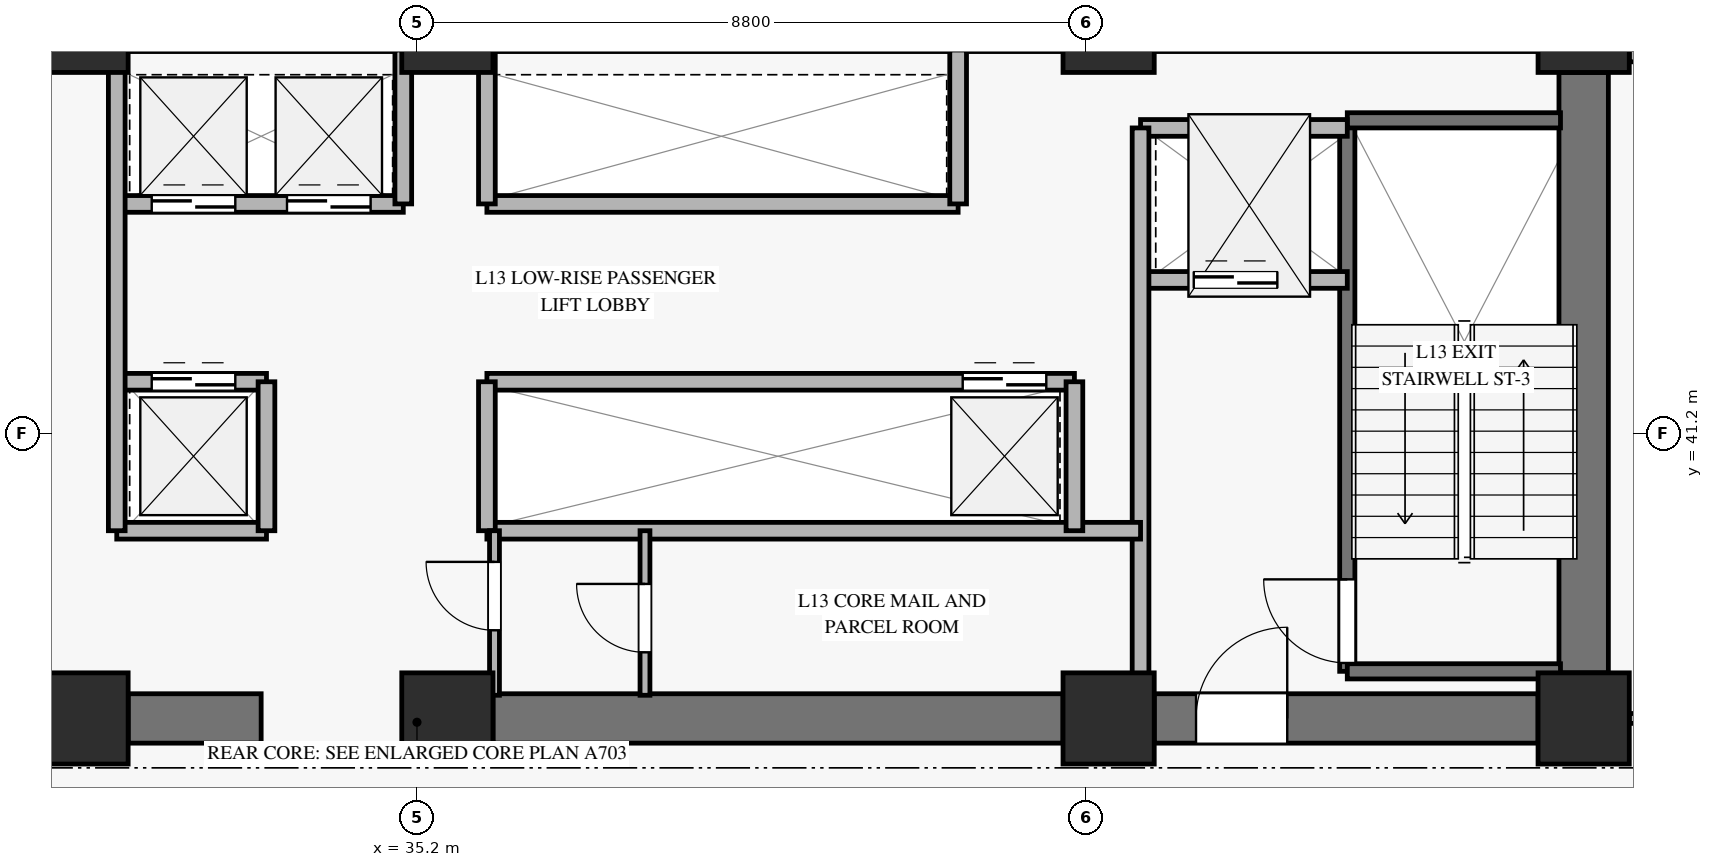
"""IFC4 building model, lengths in metres.
Left out: names, types, materials, properties, quantities, classifications, styles, units other than length and angle.
Written with IfcOpenShell. Run it as: python <this file> out.ifc"""

import sys

from ifc_helpers import new_model, si_unit, direction, frame, frame_2d, origin, origin_2d, place, context, subcontext, project, spatial, rectangle, extrude, source, transform, mapped, element, fill, save


model = new_model("IFC4")
c1 = context("Model", 3, precision=1e-05, world=origin(), true_north=direction((0.0, 1.0)))
c2 = subcontext(c1, "Body", "Model", "MODEL_VIEW")
j1 = project(units=[si_unit("LENGTHUNIT", "METRE"), si_unit("PLANEANGLEUNIT", "RADIAN")], contexts=[c1])
p1 = place(None, origin())
s1 = spatial("IfcSite", under=j1, at=p1, CompositionType="ELEMENT")
p2 = place(p1, origin())
s2 = spatial("IfcBuilding", under=s1, at=p2, CompositionType="ELEMENT")
p3 = place(p2, frame((0.0, 0.0, 53.3)))
s3 = spatial("IfcBuildingStorey", under=s2, at=p3, CompositionType="ELEMENT", Elevation=53.3)
m1 = source(origin(), c2, "Body", "SweptSolid", [
    extrude(rectangle(XDim=1.2, YDim=1.2, at=origin_2d()), origin(), (0.0, 0.0, 1.0), 3.68),
])
for number, where, z_axis, x_axis in (
    (1, (30.8, 37.45, 0.0), (0.0, 0.0, 1.0), (1.0, 0.0, 0.0)),
    (2, (30.8, 46.55, 0.0), (0.0, 0.0, 1.0), (1.0, 0.0, 0.0)),
    (3, (35.6, 37.45, 0.0), (0.0, 0.0, 1.0), (1.0, 0.0, 0.0)),
    (4, (35.6, 46.55, 0.0), (0.0, 0.0, 1.0), (1.0, 0.0, 0.0)),
    (5, (44.3, 37.45, 0.0), (0.0, 0.0, 1.0), (1.0, 0.0, 0.0)),
    (6, (44.3, 46.55, 0.0), (0.0, 0.0, 1.0), (1.0, 0.0, 0.0)),
    (7, (50.55, 37.45, 0.0), (0.0, 0.0, 1.0), (1.0, 0.0, 0.0)),
    (8, (50.55, 46.55, 0.0), (0.0, 0.0, 1.0), (1.0, 0.0, 0.0)),
):
    element("IfcColumn", number, at=place(p3, frame(where, z_axis=z_axis, x_axis=x_axis)), inside=s3, PredefinedType="PILASTER", context=c2, shape_type="MappedRepresentation", body=[
        mapped(m1, transform((0.0, 0.0, 0.0), x_axis=(1.0, 0.0, 0.0), y_axis=(0.0, 1.0, 0.0), z_axis=(0.0, 0.0, 1.0), scale=1.0)),
    ])
p4 = place(p3, frame((31.4, 37.45, 0.0), z_axis=(0.0, 0.0, 1.0), x_axis=(1.0, 0.0, 0.0)))
e9 = element("IfcWall", 9, at=p4, inside=s3, PredefinedType="SHEAR", context=c2, shape_type="SweptSolid", body=[
    extrude(rectangle(XDim=1.75, YDim=0.65, at=frame_2d((0.875, 0.0))), origin(), (0.0, 0.0, 1.0), 3.68),
])
p5 = place(p3, frame((36.2, 37.45, 0.0), z_axis=(0.0, 0.0, 1.0), x_axis=(1.0, 0.0, 0.0)))
e10 = element("IfcWall", 10, at=p5, inside=s3, PredefinedType="SHEAR", context=c2, shape_type="SweptSolid", body=[
    extrude(rectangle(XDim=7.5, YDim=0.65, at=frame_2d((3.75, 0.0))), origin(), (0.0, 0.0, 1.0), 3.68),
])
p6 = place(p3, frame((44.9, 37.45, 0.0), z_axis=(0.0, 0.0, 1.0), x_axis=(1.0, 0.0, 0.0)))
e11 = element("IfcWall", 11, at=p6, inside=s3, PredefinedType="SHEAR", context=c2, shape_type="SweptSolid", body=[
    extrude(rectangle(XDim=5.05, YDim=0.65, at=frame_2d((2.525, 0.0))), origin(), (0.0, 0.0, 1.0), 3.68),
])
p7 = place(p6, frame((0.55, 0.0, 0.0)))
e12 = element("IfcOpeningElement", 12, at=p7, cuts=e11, PredefinedType="OPENING", context=c2, shape_type="SweptSolid", body=[
    extrude(rectangle(XDim=1.2, YDim=2.15, at=frame_2d((0.6, 1.075))), frame((0.0, 0.335, 0.0), z_axis=(0.0, -1.0, 0.0), x_axis=(1.0, 0.0, 0.0)), (0.0, 0.0, 1.0), 0.67),
])
p8 = place(p3, frame((50.55, 38.05, 0.0), z_axis=(0.0, 0.0, 1.0), x_axis=(0.0, 1.0, 0.0)))
e13 = element("IfcWall", 13, at=p8, inside=s3, PredefinedType="SHEAR", context=c2, shape_type="SweptSolid", body=[
    extrude(rectangle(XDim=7.9, YDim=0.65, at=frame_2d((3.95, 0.0))), origin(), (0.0, 0.0, 1.0), 3.68),
])
p9 = place(p3, frame((51.15, 46.25, 0.0), z_axis=(0.0, 0.0, 1.0), x_axis=(1.0, 0.0, 0.0)))
e14 = element("IfcWall", 14, at=p9, inside=s3, PredefinedType="SOLIDWALL", context=c2, shape_type="SweptSolid", body=[
    extrude(rectangle(XDim=11.982, YDim=0.32, at=frame_2d((5.991, 0.0))), origin(), (0.0, 0.0, 1.0), 3.16),
])
p10 = place(p9, frame((5.191, 0.0, 0.45)))
e15 = element("IfcOpeningElement", 15, at=p10, cuts=e14, PredefinedType="OPENING", context=c2, shape_type="SweptSolid", body=[
    extrude(rectangle(XDim=1.6, YDim=2.0, at=frame_2d((0.8, 1.0))), frame((0.0, 0.17, 0.0), z_axis=(0.0, -1.0, 0.0), x_axis=(1.0, 0.0, 0.0)), (0.0, 0.0, 1.0), 0.34),
])
p11 = place(p3, frame((47.44, 38.07, 0.0), z_axis=(0.0, 0.0, 1.0), x_axis=(0.0, 1.0, 0.0)))
e16 = element("IfcWall", 16, at=p11, inside=s3, PredefinedType="SOLIDWALL", context=c2, shape_type="SweptSolid", body=[
    extrude(rectangle(XDim=7.25, YDim=0.2, at=frame_2d((3.625, 0.0))), origin(), (0.0, 0.0, 1.0), 3.9),
])
p12 = place(p11, frame((0.11, 0.0, 0.0)))
e17 = element("IfcOpeningElement", 17, at=p12, cuts=e16, PredefinedType="OPENING", context=c2, shape_type="SweptSolid", body=[
    extrude(rectangle(XDim=1.1, YDim=2.15, at=frame_2d((0.55, 1.075))), frame((0.0, 0.11, 0.0), z_axis=(0.0, -1.0, 0.0), x_axis=(1.0, 0.0, 0.0)), (0.0, 0.0, 1.0), 0.22),
])
for number, where, z_axis, x_axis in (
    (18, (47.44, 45.32, 0.0), (0.0, 0.0, 1.0), (1.0, 0.0, 0.0)),
    (19, (47.44, 38.07, 0.0), (0.0, 0.0, 1.0), (1.0, 0.0, 0.0)),
):
    element("IfcWall", number, at=place(p3, frame(where, z_axis=z_axis, x_axis=x_axis)), inside=s3, PredefinedType="SOLIDWALL", context=c2, shape_type="SweptSolid", body=[
        extrude(rectangle(XDim=2.805, YDim=0.2, at=frame_2d((1.403, 0.0))), origin(), (0.0, 0.0, 1.0), 3.9),
    ])
p13 = place(p3, frame((44.72, 43.22, 0.0), z_axis=(0.0, 0.0, 1.0), x_axis=(1.0, 0.0, 0.0)))
e20 = element("IfcWall", 20, at=p13, inside=s3, PredefinedType="SOLIDWALL", context=c2, shape_type="SweptSolid", body=[
    extrude(rectangle(XDim=2.72, YDim=0.22, at=frame_2d((1.36, 0.0))), origin(), (0.0, 0.0, 1.0), 3.68),
])
p14 = place(p13, frame((0.7, 0.0, 0.0)))
e21 = element("IfcOpeningElement", 21, at=p14, cuts=e20, PredefinedType="OPENING", context=c2, shape_type="SweptSolid", body=[
    extrude(rectangle(XDim=1.1, YDim=2.2, at=frame_2d((0.55, 1.1))), frame((0.0, 0.12, 0.0), z_axis=(0.0, -1.0, 0.0), x_axis=(1.0, 0.0, 0.0)), (0.0, 0.0, 1.0), 0.24),
])
p15 = place(p3, frame((44.72, 45.22, 0.0), z_axis=(0.0, 0.0, 1.0), x_axis=(1.0, 0.0, 0.0)))
e22 = element("IfcWall", 22, at=p15, inside=s3, PredefinedType="SOLIDWALL", context=c2, shape_type="SweptSolid", body=[
    extrude(rectangle(XDim=2.72, YDim=0.22, at=frame_2d((1.36, 0.0))), origin(), (0.0, 0.0, 1.0), 3.68),
])
p16 = place(p3, frame((44.72, 37.755, 0.0), z_axis=(0.0, 0.0, 1.0), x_axis=(0.0, 1.0, 0.0)))
e23 = element("IfcWall", 23, at=p16, inside=s3, PredefinedType="SOLIDWALL", context=c2, shape_type="SweptSolid", body=[
    extrude(rectangle(XDim=7.465, YDim=0.22, at=frame_2d((3.732, 0.0))), origin(), (0.0, 0.0, 1.0), 3.68),
])
p17 = place(p3, frame((31.25, 44.22, 0.0), z_axis=(0.0, 0.0, 1.0), x_axis=(1.0, 0.0, 0.0)))
e24 = element("IfcWall", 24, at=p17, inside=s3, PredefinedType="SOLIDWALL", context=c2, shape_type="SweptSolid", body=[
    extrude(rectangle(XDim=3.77, YDim=0.22, at=frame_2d((1.885, 0.0))), origin(), (0.0, 0.0, 1.0), 3.68),
])
p18 = place(p17, frame((0.46, 0.0, 0.0)))
e25 = element("IfcOpeningElement", 25, at=p18, cuts=e24, PredefinedType="OPENING", context=c2, shape_type="SweptSolid", body=[
    extrude(rectangle(XDim=1.1, YDim=2.2, at=frame_2d((0.55, 1.1))), frame((0.0, 0.12, 0.0), z_axis=(0.0, -1.0, 0.0), x_axis=(1.0, 0.0, 0.0)), (0.0, 0.0, 1.0), 0.24),
])
p19 = place(p17, frame((2.24, 0.0, 0.0)))
e26 = element("IfcOpeningElement", 26, at=p19, cuts=e24, PredefinedType="OPENING", context=c2, shape_type="SweptSolid", body=[
    extrude(rectangle(XDim=1.1, YDim=2.2, at=frame_2d((0.55, 1.1))), frame((0.0, 0.12, 0.0), z_axis=(0.0, -1.0, 0.0), x_axis=(1.0, 0.0, 0.0)), (0.0, 0.0, 1.0), 0.24),
])
p20 = place(p3, frame((36.12, 44.22, 0.0), z_axis=(0.0, 0.0, 1.0), x_axis=(1.0, 0.0, 0.0)))
e27 = element("IfcWall", 27, at=p20, inside=s3, PredefinedType="SOLIDWALL", context=c2, shape_type="SweptSolid", body=[
    extrude(rectangle(XDim=6.2, YDim=0.22, at=frame_2d((3.1, 0.0))), origin(), (0.0, 0.0, 1.0), 3.68),
])
for number, where, z_axis, x_axis in (
    (28, (35.02, 44.22, 0.0), (0.0, 0.0, 1.0), (0.0, 1.0, 0.0)),
    (29, (36.12, 44.22, 0.0), (0.0, 0.0, 1.0), (0.0, 1.0, 0.0)),
    (30, (42.32, 44.22, 0.0), (0.0, 0.0, 1.0), (0.0, 1.0, 0.0)),
):
    element("IfcWall", number, at=place(p3, frame(where, z_axis=z_axis, x_axis=x_axis)), inside=s3, PredefinedType="SOLIDWALL", context=c2, shape_type="SweptSolid", body=[
        extrude(rectangle(XDim=2.025, YDim=0.22, at=frame_2d((1.013, 0.0))), origin(), (0.0, 0.0, 1.0), 3.68),
    ])
p21 = place(p3, frame((31.25, 41.88, 0.0), z_axis=(0.0, 0.0, 1.0), x_axis=(1.0, 0.0, 0.0)))
e31 = element("IfcWall", 31, at=p21, inside=s3, PredefinedType="SOLIDWALL", context=c2, shape_type="SweptSolid", body=[
    extrude(rectangle(XDim=1.97, YDim=0.22, at=frame_2d((0.985, 0.0))), origin(), (0.0, 0.0, 1.0), 3.68),
])
p22 = place(p21, frame((0.46, 0.0, 0.0)))
e32 = element("IfcOpeningElement", 32, at=p22, cuts=e31, PredefinedType="OPENING", context=c2, shape_type="SweptSolid", body=[
    extrude(rectangle(XDim=1.1, YDim=2.2, at=frame_2d((0.55, 1.1))), frame((0.0, 0.12, 0.0), z_axis=(0.0, -1.0, 0.0), x_axis=(1.0, 0.0, 0.0)), (0.0, 0.0, 1.0), 0.24),
])
p23 = place(p3, frame((36.12, 41.88, 0.0), z_axis=(0.0, 0.0, 1.0), x_axis=(1.0, 0.0, 0.0)))
e33 = element("IfcWall", 33, at=p23, inside=s3, PredefinedType="SOLIDWALL", context=c2, shape_type="SweptSolid", body=[
    extrude(rectangle(XDim=7.73, YDim=0.22, at=frame_2d((3.865, 0.0))), origin(), (0.0, 0.0, 1.0), 3.68),
])
p24 = place(p23, frame((6.26, 0.0, 0.0)))
e34 = element("IfcOpeningElement", 34, at=p24, cuts=e33, PredefinedType="OPENING", context=c2, shape_type="SweptSolid", body=[
    extrude(rectangle(XDim=1.1, YDim=2.2, at=frame_2d((0.55, 1.1))), frame((0.0, 0.12, 0.0), z_axis=(0.0, -1.0, 0.0), x_axis=(1.0, 0.0, 0.0)), (0.0, 0.0, 1.0), 0.24),
])
p25 = place(p3, frame((31.25, 39.92, 0.0), z_axis=(0.0, 0.0, 1.0), x_axis=(1.0, 0.0, 0.0)))
e35 = element("IfcWall", 35, at=p25, inside=s3, PredefinedType="SOLIDWALL", context=c2, shape_type="SweptSolid", body=[
    extrude(rectangle(XDim=1.97, YDim=0.22, at=frame_2d((0.985, 0.0))), origin(), (0.0, 0.0, 1.0), 3.68),
])
p26 = place(p3, frame((33.22, 39.92, 0.0), z_axis=(0.0, 0.0, 1.0), x_axis=(0.0, 1.0, 0.0)))
e36 = element("IfcWall", 36, at=p26, inside=s3, PredefinedType="SOLIDWALL", context=c2, shape_type="SweptSolid", body=[
    extrude(rectangle(XDim=1.96, YDim=0.22, at=frame_2d((0.98, 0.0))), origin(), (0.0, 0.0, 1.0), 3.68),
])
p27 = place(p3, frame((36.12, 39.92, 0.0), z_axis=(0.0, 0.0, 1.0), x_axis=(1.0, 0.0, 0.0)))
e37 = element("IfcWall", 37, at=p27, inside=s3, PredefinedType="SOLIDWALL", context=c2, shape_type="SweptSolid", body=[
    extrude(rectangle(XDim=8.6, YDim=0.22, at=frame_2d((4.3, 0.0))), origin(), (0.0, 0.0, 1.0), 2.965),
])
p28 = place(p3, frame((36.12, 39.92, 0.0), z_axis=(0.0, 0.0, 1.0), x_axis=(0.0, 1.0, 0.0)))
e38 = element("IfcWall", 38, at=p28, inside=s3, PredefinedType="SOLIDWALL", context=c2, shape_type="SweptSolid", body=[
    extrude(rectangle(XDim=1.96, YDim=0.22, at=frame_2d((0.98, 0.0))), origin(), (0.0, 0.0, 1.0), 3.68),
])
p29 = place(p3, frame((31.25, 39.92, 0.0), z_axis=(0.0, 0.0, 1.0), x_axis=(0.0, 1.0, 0.0)))
e39 = element("IfcWall", 39, at=p29, inside=s3, PredefinedType="SOLIDWALL", context=c2, shape_type="SweptSolid", body=[
    extrude(rectangle(XDim=6.325, YDim=0.22, at=frame_2d((3.163, 0.0))), origin(), (0.0, 0.0, 1.0), 3.68),
])
p30 = place(p3, frame((43.85, 39.92, 0.0), z_axis=(0.0, 0.0, 1.0), x_axis=(0.0, 1.0, 0.0)))
e40 = element("IfcWall", 40, at=p30, inside=s3, PredefinedType="SOLIDWALL", context=c2, shape_type="SweptSolid", body=[
    extrude(rectangle(XDim=1.96, YDim=0.22, at=frame_2d((0.98, 0.0))), origin(), (0.0, 0.0, 1.0), 3.68),
])
p31 = place(p3, frame((36.22, 37.755, 0.0), z_axis=(0.0, 0.0, 1.0), x_axis=(0.0, 1.0, 0.0)))
e41 = element("IfcWall", 41, at=p31, inside=s3, PredefinedType="PARTITIONING", context=c2, shape_type="SweptSolid", body=[
    extrude(rectangle(XDim=2.165, YDim=0.13, at=frame_2d((1.083, 0.0))), origin(), (0.0, 0.0, 1.0), 3.68),
])
p32 = place(p31, frame((0.855, 0.0, 0.0)))
e42 = element("IfcOpeningElement", 42, at=p32, cuts=e41, PredefinedType="OPENING", context=c2, shape_type="SweptSolid", body=[
    extrude(rectangle(XDim=0.9, YDim=2.1, at=frame_2d((0.45, 1.05))), frame((0.0, 0.075, 0.0), z_axis=(0.0, -1.0, 0.0), x_axis=(1.0, 0.0, 0.0)), (0.0, 0.0, 1.0), 0.15),
])
p33 = place(p3, frame((38.2, 37.755, 0.0), z_axis=(0.0, 0.0, 1.0), x_axis=(0.0, 1.0, 0.0)))
e43 = element("IfcWall", 43, at=p33, inside=s3, PredefinedType="PARTITIONING", context=c2, shape_type="SweptSolid", body=[
    extrude(rectangle(XDim=2.165, YDim=0.13, at=frame_2d((1.083, 0.0))), origin(), (0.0, 0.0, 1.0), 3.68),
])
p34 = place(p33, frame((0.565, 0.0, 0.0)))
e44 = element("IfcOpeningElement", 44, at=p34, cuts=e43, PredefinedType="OPENING", context=c2, shape_type="SweptSolid", body=[
    extrude(rectangle(XDim=0.9, YDim=2.1, at=frame_2d((0.45, 1.05))), frame((0.0, 0.075, 0.0), z_axis=(0.0, -1.0, 0.0), x_axis=(1.0, 0.0, 0.0)), (0.0, 0.0, 1.0), 0.15),
])
p35 = place(p3, frame((51.15, 37.45, 0.0), z_axis=(0.0, 0.0, 1.0), x_axis=(1.0, 0.0, 0.0)))
e45 = element("IfcWall", 45, at=p35, inside=s3, PredefinedType="PARTITIONING", context=c2, shape_type="SweptSolid", body=[
    extrude(rectangle(XDim=15.68, YDim=0.13, at=frame_2d((7.84, 0.0))), origin(), (0.0, 0.0, 1.0), 3.165),
])
p36 = place(p35, frame((0.5, 0.0, 0.0)))
e46 = element("IfcOpeningElement", 46, at=p36, cuts=e45, PredefinedType="OPENING", context=c2, shape_type="SweptSolid", body=[
    extrude(rectangle(XDim=0.9, YDim=2.1, at=frame_2d((0.45, 1.05))), frame((0.0, 0.075, 0.0), z_axis=(0.0, -1.0, 0.0), x_axis=(1.0, 0.0, 0.0)), (0.0, 0.0, 1.0), 0.15),
])
p37 = place(p35, frame((11.416, 0.0, 0.0)))
e47 = element("IfcOpeningElement", 47, at=p37, cuts=e45, PredefinedType="OPENING", context=c2, shape_type="SweptSolid", body=[
    extrude(rectangle(XDim=0.95, YDim=2.1, at=frame_2d((0.475, 1.05))), frame((0.0, 0.075, 0.0), z_axis=(0.0, -1.0, 0.0), x_axis=(1.0, 0.0, 0.0)), (0.0, 0.0, 1.0), 0.15),
])
m2 = source(origin(), c2, "Body", "SweptSolid", [
    extrude(rectangle(XDim=1.1, YDim=2.15, at=frame_2d((0.55, 1.075))), frame((0.0, 0.025, 0.0), z_axis=(0.0, -1.0, 0.0), x_axis=(1.0, 0.0, 0.0)), (0.0, 0.0, 1.0), 0.05),
])
p38 = place(p12, origin())
e48 = element("IfcDoor", 48, at=p38, inside=s3, OperationType="SINGLE_SWING_RIGHT", PredefinedType="DOOR", context=c2, shape_type="MappedRepresentation", body=[
    mapped(m2, transform((0.0, 0.0, 0.0), x_axis=(1.0, 0.0, 0.0), y_axis=(0.0, 1.0, 0.0), z_axis=(0.0, 0.0, 1.0), scale=1.0)),
])
fill(e17, e48)
m3 = source(origin(), c2, "Body", "SweptSolid", [
    extrude(rectangle(XDim=1.1, YDim=2.2, at=frame_2d((0.55, 1.1))), frame((0.0, 0.025, 0.0), z_axis=(0.0, -1.0, 0.0), x_axis=(1.0, 0.0, 0.0)), (0.0, 0.0, 1.0), 0.05),
])
p39 = place(p14, origin())
e49 = element("IfcDoor", 49, at=p39, inside=s3, OperationType="SLIDING_TO_LEFT", PredefinedType="DOOR", context=c2, shape_type="MappedRepresentation", body=[
    mapped(m3, transform((0.0, 0.0, 0.0), x_axis=(1.0, 0.0, 0.0), y_axis=(0.0, 1.0, 0.0), z_axis=(0.0, 0.0, 1.0), scale=1.0)),
])
fill(e21, e49)
m4 = source(origin(), c2, "Body", "SweptSolid", [
    extrude(rectangle(XDim=1.2, YDim=2.15, at=frame_2d((0.6, 1.075))), frame((0.0, 0.025, 0.0), z_axis=(0.0, -1.0, 0.0), x_axis=(1.0, 0.0, 0.0)), (0.0, 0.0, 1.0), 0.05),
])
p40 = place(p7, origin())
e50 = element("IfcDoor", 50, at=p40, inside=s3, OperationType="SINGLE_SWING_RIGHT", PredefinedType="DOOR", context=c2, shape_type="MappedRepresentation", body=[
    mapped(m4, transform((0.0, 0.0, 0.0), x_axis=(1.0, 0.0, 0.0), y_axis=(0.0, 1.0, 0.0), z_axis=(0.0, 0.0, 1.0), scale=1.0)),
])
fill(e12, e50)
p41 = place(p18, origin())
e51 = element("IfcDoor", 51, at=p41, inside=s3, OperationType="SLIDING_TO_LEFT", PredefinedType="DOOR", context=c2, shape_type="MappedRepresentation", body=[
    mapped(m3, transform((0.0, 0.0, 0.0), x_axis=(1.0, 0.0, 0.0), y_axis=(0.0, 1.0, 0.0), z_axis=(0.0, 0.0, 1.0), scale=1.0)),
])
fill(e25, e51)
p42 = place(p19, origin())
e52 = element("IfcDoor", 52, at=p42, inside=s3, OperationType="SLIDING_TO_LEFT", PredefinedType="DOOR", context=c2, shape_type="MappedRepresentation", body=[
    mapped(m3, transform((0.0, 0.0, 0.0), x_axis=(1.0, 0.0, 0.0), y_axis=(0.0, 1.0, 0.0), z_axis=(0.0, 0.0, 1.0), scale=1.0)),
])
fill(e26, e52)
p43 = place(p22, origin())
e53 = element("IfcDoor", 53, at=p43, inside=s3, OperationType="SLIDING_TO_LEFT", PredefinedType="DOOR", context=c2, shape_type="MappedRepresentation", body=[
    mapped(m3, transform((0.0, 0.0, 0.0), x_axis=(1.0, 0.0, 0.0), y_axis=(0.0, 1.0, 0.0), z_axis=(0.0, 0.0, 1.0), scale=1.0)),
])
fill(e32, e53)
p44 = place(p24, origin())
e54 = element("IfcDoor", 54, at=p44, inside=s3, OperationType="SLIDING_TO_LEFT", PredefinedType="DOOR", context=c2, shape_type="MappedRepresentation", body=[
    mapped(m3, transform((0.0, 0.0, 0.0), x_axis=(1.0, 0.0, 0.0), y_axis=(0.0, 1.0, 0.0), z_axis=(0.0, 0.0, 1.0), scale=1.0)),
])
fill(e34, e54)
m5 = source(origin(), c2, "Body", "SweptSolid", [
    extrude(rectangle(XDim=0.9, YDim=2.1, at=frame_2d((0.45, 1.05))), frame((0.0, 0.025, 0.0), z_axis=(0.0, -1.0, 0.0), x_axis=(1.0, 0.0, 0.0)), (0.0, 0.0, 1.0), 0.05),
])
p45 = place(p32, origin())
e55 = element("IfcDoor", 55, at=p45, inside=s3, OperationType="SINGLE_SWING_RIGHT", PredefinedType="DOOR", context=c2, shape_type="MappedRepresentation", body=[
    mapped(m5, transform((0.0, 0.0, 0.0), x_axis=(1.0, 0.0, 0.0), y_axis=(0.0, 1.0, 0.0), z_axis=(0.0, 0.0, 1.0), scale=1.0)),
])
fill(e42, e55)
p46 = place(p34, origin())
e56 = element("IfcDoor", 56, at=p46, inside=s3, OperationType="SINGLE_SWING_RIGHT", PredefinedType="DOOR", context=c2, shape_type="MappedRepresentation", body=[
    mapped(m5, transform((0.0, 0.0, 0.0), x_axis=(1.0, 0.0, 0.0), y_axis=(0.0, 1.0, 0.0), z_axis=(0.0, 0.0, 1.0), scale=1.0)),
])
fill(e44, e56)
save(model, sys.argv[1])
